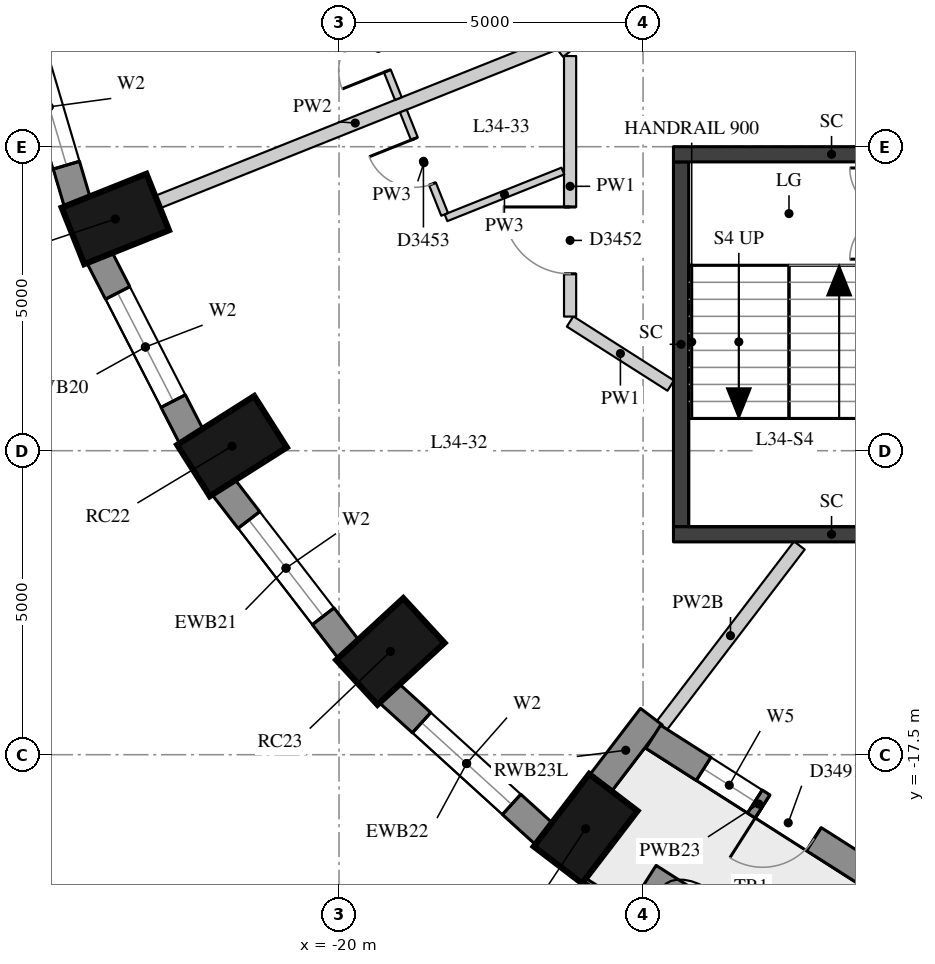
"""IFC4 building model, lengths in metres.
Left out: names, types, materials, properties, quantities, classifications, styles, units other than length and angle.
Written with IfcOpenShell. Run it as: python <this file> out.ifc"""

import sys

from ifc_helpers import new_model, si_unit, direction, frame, frame_2d, origin, origin_2d, place, context, subcontext, project, spatial, rectangle, extrude, element, fill, save


model = new_model("IFC4")
c1 = context("Model", 3, precision=1e-05, world=origin(), true_north=direction((0.0, 1.0)))
c2 = subcontext(c1, "Body", "Model", "MODEL_VIEW")
j1 = project(units=[si_unit("LENGTHUNIT", "METRE"), si_unit("PLANEANGLEUNIT", "RADIAN")], contexts=[c1])
p1 = place(None, origin())
s1 = spatial("IfcSite", under=j1, at=p1, CompositionType="ELEMENT")
p2 = place(p1, origin())
s2 = spatial("IfcBuilding", under=s1, at=p2, CompositionType="ELEMENT")
p3 = place(p2, frame((0.0, 0.0, 121.9)))
s3 = spatial("IfcBuildingStorey", under=s2, at=p3, CompositionType="ELEMENT", Elevation=121.9)
for number, where, z_axis, x_axis in (
    (1, (-23.679, -8.689, 0.0), (0.0, 0.0, 1.0), (-0.929, -0.371, 0.0)),
    (2, (-21.76, -12.425, 0.0), (0.0, 0.0, 1.0), (-0.845, -0.536, 0.0)),
    (3, (-19.156, -15.802, 0.0), (0.0, 0.0, 1.0), (-0.735, -0.678, 0.0)),
    (4, (-15.945, -18.717, 0.0), (0.0, 0.0, 1.0), (-0.607, -0.795, 0.0)),
):
    element("IfcColumn", number, at=place(p3, frame(where, z_axis=z_axis, x_axis=x_axis)), inside=s3, PredefinedType="COLUMN", context=c2, shape_type="SweptSolid", body=[
        extrude(rectangle(XDim=1.5, YDim=1.0, at=origin_2d()), origin(), (0.0, 0.0, 1.0), 3.3),
    ])
p4 = place(p3, frame((-25.232, -5.269, 0.0), z_axis=(0.0, 0.0, 1.0), x_axis=(0.283051078697, -0.959104836214, 0.0)))
e5 = element("IfcWall", 5, at=p4, inside=s3, PredefinedType="SOLIDWALL", context=c2, shape_type="SweptSolid", body=[
    extrude(rectangle(XDim=3.286, YDim=0.45, at=frame_2d((1.643, 0.0))), origin(), (0.0, 0.0, 1.0), 3.02),
])
p5 = place(p4, frame((0.643, 0.0, 0.4)))
e6 = element("IfcOpeningElement", 6, at=p5, cuts=e5, PredefinedType="OPENING", context=c2, shape_type="SweptSolid", body=[
    extrude(rectangle(XDim=2.0, YDim=1.75, at=frame_2d((1.0, 0.875))), frame((0.0, 0.235, 0.0), z_axis=(0.0, -1.0, 0.0), x_axis=(1.0, 0.0, 0.0)), (0.0, 0.0, 1.0), 0.47),
])
p6 = place(p3, frame((-23.945, -9.312, 0.0), z_axis=(0.0, 0.0, 1.0), x_axis=(0.456828186229, -0.889554949549, 0.0)))
e7 = element("IfcWall", 7, at=p6, inside=s3, PredefinedType="SOLIDWALL", context=c2, shape_type="SweptSolid", body=[
    extrude(rectangle(XDim=3.333, YDim=0.45, at=frame_2d((1.667, 0.0))), origin(), (0.0, 0.0, 1.0), 3.02),
])
p7 = place(p6, frame((0.666, 0.0, 0.4)))
e8 = element("IfcOpeningElement", 8, at=p7, cuts=e7, PredefinedType="OPENING", context=c2, shape_type="SweptSolid", body=[
    extrude(rectangle(XDim=2.0, YDim=1.75, at=frame_2d((1.0, 0.875))), frame((0.0, 0.235, 0.0), z_axis=(0.0, -1.0, 0.0), x_axis=(1.0, 0.0, 0.0)), (0.0, 0.0, 1.0), 0.47),
])
p8 = place(p3, frame((-21.908, -13.087, 0.0), z_axis=(0.0, 0.0, 1.0), x_axis=(0.610693945156, -0.791866721961, 0.0)))
e9 = element("IfcWall", 9, at=p8, inside=s3, PredefinedType="SOLIDWALL", context=c2, shape_type="SweptSolid", body=[
    extrude(rectangle(XDim=3.395, YDim=0.45, at=frame_2d((1.697, 0.0))), origin(), (0.0, 0.0, 1.0), 3.02),
])
p9 = place(p8, frame((0.697, 0.0, 0.4)))
e10 = element("IfcOpeningElement", 10, at=p9, cuts=e9, PredefinedType="OPENING", context=c2, shape_type="SweptSolid", body=[
    extrude(rectangle(XDim=2.0, YDim=1.75, at=frame_2d((1.0, 0.875))), frame((0.0, 0.235, 0.0), z_axis=(0.0, -1.0, 0.0), x_axis=(1.0, 0.0, 0.0)), (0.0, 0.0, 1.0), 0.47),
])
p10 = place(p3, frame((-19.184, -16.481, 0.0), z_axis=(0.0, 0.0, 1.0), x_axis=(0.740364106106, -0.672206062446, 0.0)))
e11 = element("IfcWall", 11, at=p10, inside=s3, PredefinedType="SOLIDWALL", context=c2, shape_type="SweptSolid", body=[
    extrude(rectangle(XDim=3.464, YDim=0.45, at=frame_2d((1.732, 0.0))), origin(), (0.0, 0.0, 1.0), 3.02),
])
p11 = place(p10, frame((0.732, 0.0, 0.4)))
e12 = element("IfcOpeningElement", 12, at=p11, cuts=e11, PredefinedType="OPENING", context=c2, shape_type="SweptSolid", body=[
    extrude(rectangle(XDim=2.0, YDim=1.75, at=frame_2d((1.0, 0.875))), frame((0.0, 0.235, 0.0), z_axis=(0.0, -1.0, 0.0), x_axis=(1.0, 0.0, 0.0)), (0.0, 0.0, 1.0), 0.47),
])
p12 = place(p3, frame((-15.708, -17.979, 0.0), z_axis=(0.0, 0.0, 1.0), x_axis=(0.607026495834, 0.794681592435, 0.0)))
e13 = element("IfcWall", 13, at=p12, inside=s3, PredefinedType="SOLIDWALL", context=c2, shape_type="SweptSolid", body=[
    extrude(rectangle(XDim=1.391, YDim=0.45, at=frame_2d((0.695, 0.0))), origin(), (0.0, 0.0, 1.0), 2.57),
])
p13 = place(p3, frame((-14.833, -17.205, 0.0), z_axis=(0.0, 0.0, 1.0), x_axis=(0.843255766903, -0.537512522259, 0.0)))
e14 = element("IfcWall", 14, at=p13, inside=s3, PredefinedType="SOLIDWALL", context=c2, shape_type="SweptSolid", body=[
    extrude(rectangle(XDim=4.115, YDim=0.45, at=frame_2d((2.058, 0.0))), origin(), (0.0, 0.0, 1.0), 3.02),
])
p14 = place(p13, frame((0.983, 0.0, 0.4)))
e15 = element("IfcOpeningElement", 15, at=p14, cuts=e14, PredefinedType="OPENING", context=c2, shape_type="SweptSolid", body=[
    extrude(rectangle(XDim=1.0, YDim=1.75, at=frame_2d((0.5, 0.875))), frame((0.0, 0.235, 0.0), z_axis=(0.0, -1.0, 0.0), x_axis=(1.0, 0.0, 0.0)), (0.0, 0.0, 1.0), 0.47),
])
p15 = place(p13, frame((2.133, 0.0, 0.0)))
e16 = element("IfcOpeningElement", 16, at=p15, cuts=e14, PredefinedType="OPENING", context=c2, shape_type="SweptSolid", body=[
    extrude(rectangle(XDim=1.0, YDim=2.15, at=frame_2d((0.5, 1.075))), frame((0.0, 0.235, 0.0), z_axis=(0.0, -1.0, 0.0), x_axis=(1.0, 0.0, 0.0)), (0.0, 0.0, 1.0), 0.47),
])
p16 = place(p3, frame((-14.973, -19.616, 0.0), z_axis=(0.0, 0.0, 1.0), x_axis=(0.843873638802, -0.536541966425, 0.0)))
e17 = element("IfcWall", 17, at=p16, inside=s3, PredefinedType="USERDEFINED", context=c2, shape_type="SweptSolid", body=[
    extrude(rectangle(XDim=1.8, YDim=0.7, at=frame_2d((0.9, 0.0))), origin(), (0.0, 0.0, 1.0), 0.75),
])
p17 = place(p3, frame((-14.375, -13.75, -0.28), z_axis=(0.0, 0.0, 1.0), x_axis=(0.0, 1.0, 0.0)))
e18 = element("IfcWall", 18, at=p17, inside=s3, PredefinedType="SHEAR", context=c2, shape_type="SweptSolid", body=[
    extrude(rectangle(XDim=6.0, YDim=0.25, at=frame_2d((3.0, 0.0))), origin(), (0.0, 0.0, 1.0), 3.3),
])
for number, where, z_axis, x_axis in (
    (19, (-14.5, -7.625, -0.28), (0.0, 0.0, 1.0), (1.0, 0.0, 0.0)),
    (20, (-14.5, -13.875, -0.28), (0.0, 0.0, 1.0), (1.0, 0.0, 0.0)),
):
    element("IfcWall", number, at=place(p3, frame(where, z_axis=z_axis, x_axis=x_axis)), inside=s3, PredefinedType="SHEAR", context=c2, shape_type="SweptSolid", body=[
        extrude(rectangle(XDim=5.2, YDim=0.25, at=frame_2d((2.6, 0.0))), origin(), (0.0, 0.0, 1.0), 3.3),
    ])
p18 = place(p3, frame((-14.545, -11.429, 0.0), z_axis=(0.0, 0.0, 1.0), x_axis=(-0.843261732334, 0.537503163507, 0.0)))
e21 = element("IfcWall", 21, at=p18, inside=s3, PredefinedType="PARTITIONING", context=c2, shape_type="SweptSolid", body=[
    extrude(rectangle(XDim=1.963, YDim=0.2, at=frame_2d((0.981, 0.0))), origin(), (0.0, 0.0, 1.0), 3.02),
])
p19 = place(p3, frame((-16.2, -10.294, 0.0), z_axis=(0.0, 0.0, 1.0), x_axis=(0.0, 1.0, 0.0)))
e22 = element("IfcWall", 22, at=p19, inside=s3, PredefinedType="PARTITIONING", context=c2, shape_type="SweptSolid", body=[
    extrude(rectangle(XDim=4.285, YDim=0.2, at=frame_2d((2.143, 0.0))), origin(), (0.0, 0.0, 1.0), 3.02),
])
p20 = place(p19, frame((0.703, 0.0, 0.0)))
e23 = element("IfcOpeningElement", 23, at=p20, cuts=e22, PredefinedType="OPENING", context=c2, shape_type="SweptSolid", body=[
    extrude(rectangle(XDim=1.1, YDim=2.1, at=frame_2d((0.55, 1.05))), frame((0.0, 0.11, 0.0), z_axis=(0.0, -1.0, 0.0), x_axis=(1.0, 0.0, 0.0)), (0.0, 0.0, 1.0), 0.22),
])
p21 = place(p3, frame((-16.237, -5.961, 0.0), z_axis=(0.0, 0.0, 1.0), x_axis=(-0.61310674242, 0.790000077468, 0.0)))
e24 = element("IfcWall", 24, at=p21, inside=s3, PredefinedType="PARTITIONING", context=c2, shape_type="SweptSolid", body=[
    extrude(rectangle(XDim=0.264, YDim=0.2, at=frame_2d((0.132, 0.0))), origin(), (0.0, 0.0, 1.0), 3.02),
])
p22 = place(p3, frame((-22.983, -8.41, 0.0), z_axis=(0.0, 0.0, 1.0), x_axis=(0.928551252469, 0.371204218105, 0.0)))
e25 = element("IfcWall", 25, at=p22, inside=s3, PredefinedType="PARTITIONING", context=c2, shape_type="SweptSolid", body=[
    extrude(rectangle(XDim=6.999, YDim=0.22, at=frame_2d((3.499, 0.0))), origin(), (0.0, 0.0, 1.0), 3.02),
])
p23 = place(p3, frame((-14.696, -17.025, 0.0), z_axis=(0.0, 0.0, 1.0), x_axis=(0.607059278405, 0.794656550028, 0.0)))
e26 = element("IfcWall", 26, at=p23, inside=s3, PredefinedType="PARTITIONING", context=c2, shape_type="SweptSolid", body=[
    extrude(rectangle(XDim=3.734, YDim=0.22, at=frame_2d((1.867, 0.0))), origin(), (0.0, 0.0, 1.0), 2.57),
])
p24 = place(p3, frame((-16.319, -7.9, 0.0), z_axis=(0.0, 0.0, 1.0), x_axis=(-0.92852548478, -0.371268668371, 0.0)))
e27 = element("IfcWall", 27, at=p24, inside=s3, PredefinedType="PARTITIONING", context=c2, shape_type="SweptSolid", body=[
    extrude(rectangle(XDim=2.07, YDim=0.12, at=frame_2d((1.035, 0.0))), origin(), (0.0, 0.0, 1.0), 3.02),
])
p25 = place(p3, frame((-19.703, -5.01, 0.0), z_axis=(0.0, 0.0, 1.0), x_axis=(0.371229680537, -0.928541073022, 0.0)))
e28 = element("IfcWall", 28, at=p25, inside=s3, PredefinedType="PARTITIONING", context=c2, shape_type="SweptSolid", body=[
    extrude(rectangle(XDim=1.83, YDim=0.12, at=frame_2d((0.915, 0.0))), origin(), (0.0, 0.0, 1.0), 3.02),
])
p26 = place(p25, frame((0.54, 0.0, 0.0)))
e29 = element("IfcOpeningElement", 29, at=p26, cuts=e28, PredefinedType="OPENING", context=c2, shape_type="SweptSolid", body=[
    extrude(rectangle(XDim=0.8, YDim=2.1, at=frame_2d((0.4, 1.05))), frame((0.0, 0.07, 0.0), z_axis=(0.0, -1.0, 0.0), x_axis=(1.0, 0.0, 0.0)), (0.0, 0.0, 1.0), 0.14),
])
p27 = place(p3, frame((-18.263, -8.613, 0.0), z_axis=(0.0, 0.0, 1.0), x_axis=(-0.371229680537, 0.928541073022, 0.0)))
e30 = element("IfcWall", 30, at=p27, inside=s3, PredefinedType="PARTITIONING", context=c2, shape_type="SweptSolid", body=[
    extrude(rectangle(XDim=1.83, YDim=0.12, at=frame_2d((0.915, 0.0))), origin(), (0.0, 0.0, 1.0), 3.02),
])
p28 = place(p27, frame((0.54, 0.0, 0.0)))
e31 = element("IfcOpeningElement", 31, at=p28, cuts=e30, PredefinedType="OPENING", context=c2, shape_type="SweptSolid", body=[
    extrude(rectangle(XDim=0.8, YDim=2.1, at=frame_2d((0.4, 1.05))), frame((0.0, 0.07, 0.0), z_axis=(0.0, -1.0, 0.0), x_axis=(1.0, 0.0, 0.0)), (0.0, 0.0, 1.0), 0.14),
])
p29 = place(p5, origin())
e32 = element("IfcWindow", 32, at=p29, inside=s3, PartitioningType="SINGLE_PANEL", PredefinedType="WINDOW", context=c2, shape_type="SweptSolid", body=[
    extrude(rectangle(XDim=2.0, YDim=1.75, at=frame_2d((1.0, 0.875))), frame((0.0, 0.035, 0.0), z_axis=(0.0, -1.0, 0.0), x_axis=(1.0, 0.0, 0.0)), (0.0, 0.0, 1.0), 0.06),
])
fill(e6, e32)
p30 = place(p7, origin())
e33 = element("IfcWindow", 33, at=p30, inside=s3, PartitioningType="SINGLE_PANEL", PredefinedType="WINDOW", context=c2, shape_type="SweptSolid", body=[
    extrude(rectangle(XDim=2.0, YDim=1.75, at=frame_2d((1.0, 0.875))), frame((0.0, 0.035, 0.0), z_axis=(0.0, -1.0, 0.0), x_axis=(1.0, 0.0, 0.0)), (0.0, 0.0, 1.0), 0.06),
])
fill(e8, e33)
p31 = place(p9, origin())
e34 = element("IfcWindow", 34, at=p31, inside=s3, PartitioningType="SINGLE_PANEL", PredefinedType="WINDOW", context=c2, shape_type="SweptSolid", body=[
    extrude(rectangle(XDim=2.0, YDim=1.75, at=frame_2d((1.0, 0.875))), frame((0.0, 0.035, 0.0), z_axis=(0.0, -1.0, 0.0), x_axis=(1.0, 0.0, 0.0)), (0.0, 0.0, 1.0), 0.06),
])
fill(e10, e34)
p32 = place(p11, origin())
e35 = element("IfcWindow", 35, at=p32, inside=s3, PartitioningType="SINGLE_PANEL", PredefinedType="WINDOW", context=c2, shape_type="SweptSolid", body=[
    extrude(rectangle(XDim=2.0, YDim=1.75, at=frame_2d((1.0, 0.875))), frame((0.0, 0.035, 0.0), z_axis=(0.0, -1.0, 0.0), x_axis=(1.0, 0.0, 0.0)), (0.0, 0.0, 1.0), 0.06),
])
fill(e12, e35)
p33 = place(p14, origin())
e36 = element("IfcWindow", 36, at=p33, inside=s3, PartitioningType="SINGLE_PANEL", PredefinedType="WINDOW", context=c2, shape_type="SweptSolid", body=[
    extrude(rectangle(XDim=1.0, YDim=1.75, at=frame_2d((0.5, 0.875))), frame((0.0, 0.035, 0.0), z_axis=(0.0, -1.0, 0.0), x_axis=(1.0, 0.0, 0.0)), (0.0, 0.0, 1.0), 0.06),
])
fill(e15, e36)
p34 = place(p15, frame((1.0, 0.0, 0.0), z_axis=(0.0, 0.0, 1.0), x_axis=(-1.0, 0.0, 0.0)))
e37 = element("IfcDoor", 37, at=p34, inside=s3, OperationType="SINGLE_SWING_RIGHT", PredefinedType="DOOR", context=c2, shape_type="SweptSolid", body=[
    extrude(rectangle(XDim=1.0, YDim=2.15, at=frame_2d((0.5, 1.075))), frame((0.0, 0.075, 0.0), z_axis=(0.0, -1.0, 0.0), x_axis=(1.0, 0.0, 0.0)), (0.0, 0.0, 1.0), 0.05),
])
fill(e16, e37)
p35 = place(p26, origin())
e38 = element("IfcDoor", 38, at=p35, inside=s3, OperationType="SINGLE_SWING_LEFT", PredefinedType="DOOR", context=c2, shape_type="SweptSolid", body=[
    extrude(rectangle(XDim=0.8, YDim=2.1, at=frame_2d((0.4, 1.05))), frame((0.0, 0.025, 0.0), z_axis=(0.0, -1.0, 0.0), x_axis=(1.0, 0.0, 0.0)), (0.0, 0.0, 1.0), 0.05),
])
fill(e29, e38)
p36 = place(p20, origin())
e39 = element("IfcDoor", 39, at=p36, inside=s3, OperationType="SINGLE_SWING_RIGHT", PredefinedType="DOOR", context=c2, shape_type="SweptSolid", body=[
    extrude(rectangle(XDim=1.1, YDim=2.1, at=frame_2d((0.55, 1.05))), frame((0.0, 0.025, 0.0), z_axis=(0.0, -1.0, 0.0), x_axis=(1.0, 0.0, 0.0)), (0.0, 0.0, 1.0), 0.05),
])
fill(e23, e39)
p37 = place(p28, origin())
e40 = element("IfcDoor", 40, at=p37, inside=s3, OperationType="SINGLE_SWING_RIGHT", PredefinedType="DOOR", context=c2, shape_type="SweptSolid", body=[
    extrude(rectangle(XDim=0.8, YDim=2.1, at=frame_2d((0.4, 1.05))), frame((0.0, 0.025, 0.0), z_axis=(0.0, -1.0, 0.0), x_axis=(1.0, 0.0, 0.0)), (0.0, 0.0, 1.0), 0.05),
])
fill(e31, e40)
save(model, sys.argv[1])
